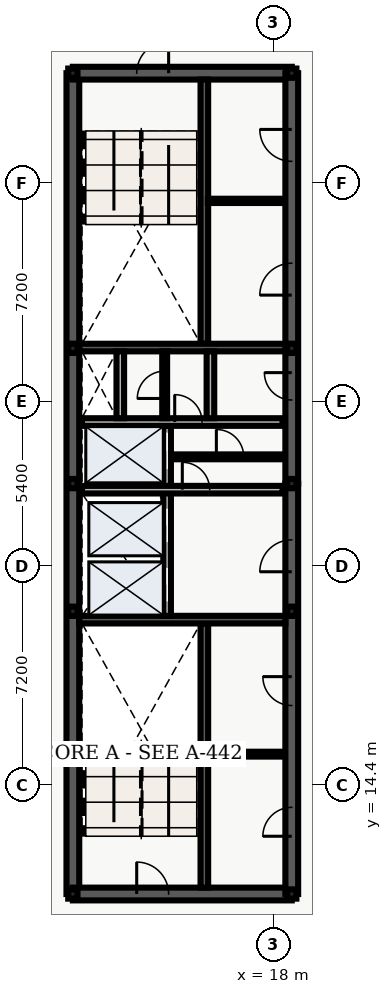
"""IFC4 building model, lengths in metres.
Left out: names, types, materials, properties, quantities, classifications, styles, units other than length and angle.
Written with IfcOpenShell. Run it as: python <this file> out.ifc"""

import sys

from ifc_helpers import new_model, entity, si_unit, converted_unit, direction, frame, origin_with_axes, origin_2d_with_axis, place, context, subcontext, project, spatial, polyline, rectangle, hollow_rectangle, outline, extrude, element, fill, save


model = new_model("IFC4")
c1 = context("Model", 3, precision=1e-05, world=origin_with_axes(), true_north=direction((0.0, 1.0)))
c2 = subcontext(c1, "Body", "Model", "MODEL_VIEW")
j1 = project(units=[si_unit("LENGTHUNIT", "METRE"), converted_unit("PLANEANGLEUNIT", "DEGREE", entity("IfcPlaneAngleMeasure", 0.017), si_unit("PLANEANGLEUNIT", "RADIAN"), dimensions=[0, 0, 0, 0, 0, 0, 0])], contexts=[c1])
p1 = place(None, origin_with_axes())
s1 = spatial("IfcSite", under=j1, at=p1, CompositionType="ELEMENT")
p2 = place(p1, origin_with_axes())
s2 = spatial("IfcBuilding", under=s1, at=p2, CompositionType="ELEMENT")
p3 = place(p2, frame((0.0, 0.0, 312.6), z_axis=(0.0, 0.0, 1.0), x_axis=(1.0, 0.0, 0.0)))
s3 = spatial("IfcBuildingStorey", under=s2, at=p3, CompositionType="ELEMENT", Elevation=312.6)
p4 = place(p3, frame((11.4, 10.8, 0.0), z_axis=(0.0, 0.0, 1.0), x_axis=(0.0, 1.0, 0.0)))
e1 = element("IfcWall", 1, at=p4, inside=s3, PredefinedType="SHEAR", context=c2, shape_type="SweptSolid", body=[
    extrude(outline(polyline([(0.0, -0.21), (27.0, -0.21), (27.0, 0.21), (0.0, 0.21), (0.0, -0.21)])), origin_with_axes(), (0.0, 0.0, 1.0), 3.64),
])
p5 = place(p3, frame((11.4, 10.8, 0.0), z_axis=(0.0, 0.0, 1.0), x_axis=(1.0, 0.0, 0.0)))
e2 = element("IfcWall", 2, at=p5, inside=s3, PredefinedType="SHEAR", context=c2, shape_type="SweptSolid", body=[
    extrude(outline(polyline([(0.0, -0.21), (7.2, -0.21), (7.2, 0.21), (0.0, 0.21), (0.0, -0.21)])), origin_with_axes(), (0.0, 0.0, 1.0), 3.64),
])
p6 = place(p5, frame((2.625, 0.0, 0.0), z_axis=(0.0, 0.0, 1.0), x_axis=(1.0, 0.0, 0.0)))
e3 = element("IfcOpeningElement", 3, at=p6, cuts=e2, PredefinedType="OPENING", context=c2, shape_type="SweptSolid", body=[
    extrude(rectangle(XDim=1.05, YDim=0.44, at=origin_2d_with_axis()), origin_with_axes(), (0.0, 0.0, 1.0), 2.15),
])
p7 = place(p3, frame((11.4, 37.8, 0.0), z_axis=(0.0, 0.0, 1.0), x_axis=(1.0, 0.0, 0.0)))
e4 = element("IfcWall", 4, at=p7, inside=s3, PredefinedType="SHEAR", context=c2, shape_type="SweptSolid", body=[
    extrude(outline(polyline([(0.0, -0.21), (7.2, -0.21), (7.2, 0.21), (0.0, 0.21), (0.0, -0.21)])), origin_with_axes(), (0.0, 0.0, 1.0), 3.64),
])
p8 = place(p7, frame((2.625, 0.0, 0.0), z_axis=(0.0, 0.0, 1.0), x_axis=(1.0, 0.0, 0.0)))
e5 = element("IfcOpeningElement", 5, at=p8, cuts=e4, PredefinedType="OPENING", context=c2, shape_type="SweptSolid", body=[
    extrude(rectangle(XDim=1.05, YDim=0.44, at=origin_2d_with_axis()), origin_with_axes(), (0.0, 0.0, 1.0), 2.15),
])
p9 = place(p3, frame((18.6, 10.8, 0.0), z_axis=(0.0, 0.0, 1.0), x_axis=(0.0, 1.0, 0.0)))
e6 = element("IfcWall", 6, at=p9, inside=s3, PredefinedType="SHEAR", context=c2, shape_type="SweptSolid", body=[
    extrude(outline(polyline([(0.0, -0.21), (13.5, -0.21), (13.5, 0.21), (0.0, 0.21), (0.0, -0.21)])), origin_with_axes(), (0.0, 0.0, 1.0), 3.64),
])
p10 = place(p9, frame((11.125, 0.0, 0.0), z_axis=(0.0, 0.0, 1.0), x_axis=(1.0, 0.0, 0.0)))
e7 = element("IfcOpeningElement", 7, at=p10, cuts=e6, PredefinedType="OPENING", context=c2, shape_type="SweptSolid", body=[
    extrude(rectangle(XDim=1.05, YDim=0.44, at=origin_2d_with_axis()), origin_with_axes(), (0.0, 0.0, 1.0), 2.15),
])
p11 = place(p9, frame((2.375, 0.0, 0.0), z_axis=(0.0, 0.0, 1.0), x_axis=(1.0, 0.0, 0.0)))
e8 = element("IfcOpeningElement", 8, at=p11, cuts=e6, PredefinedType="OPENING", context=c2, shape_type="SweptSolid", body=[
    extrude(rectangle(XDim=0.95, YDim=0.44, at=origin_2d_with_axis()), origin_with_axes(), (0.0, 0.0, 1.0), 2.15),
])
p12 = place(p9, frame((6.675, 0.0, 0.0), z_axis=(0.0, 0.0, 1.0), x_axis=(1.0, 0.0, 0.0)))
e9 = element("IfcOpeningElement", 9, at=p12, cuts=e6, PredefinedType="OPENING", context=c2, shape_type="SweptSolid", body=[
    extrude(rectangle(XDim=0.95, YDim=0.44, at=origin_2d_with_axis()), origin_with_axes(), (0.0, 0.0, 1.0), 2.15),
])
p13 = place(p3, frame((18.6, 24.3, 0.0), z_axis=(0.0, 0.0, 1.0), x_axis=(0.0, 1.0, 0.0)))
e10 = element("IfcWall", 10, at=p13, inside=s3, PredefinedType="SHEAR", context=c2, shape_type="SweptSolid", body=[
    extrude(outline(polyline([(0.0, -0.21), (13.5, -0.21), (13.5, 0.21), (0.0, 0.21), (0.0, -0.21)])), origin_with_axes(), (0.0, 0.0, 1.0), 3.64),
])
p14 = place(p13, frame((3.2, 0.0, 0.0), z_axis=(0.0, 0.0, 1.0), x_axis=(1.0, 0.0, 0.0)))
e11 = element("IfcOpeningElement", 11, at=p14, cuts=e10, PredefinedType="OPENING", context=c2, shape_type="SweptSolid", body=[
    extrude(rectangle(XDim=0.9, YDim=0.44, at=origin_2d_with_axis()), origin_with_axes(), (0.0, 0.0, 1.0), 2.15),
])
p15 = place(p13, frame((6.725, 0.0, 0.0), z_axis=(0.0, 0.0, 1.0), x_axis=(1.0, 0.0, 0.0)))
e12 = element("IfcOpeningElement", 12, at=p15, cuts=e10, PredefinedType="OPENING", context=c2, shape_type="SweptSolid", body=[
    extrude(rectangle(XDim=1.05, YDim=0.44, at=origin_2d_with_axis()), origin_with_axes(), (0.0, 0.0, 1.0), 2.15),
])
p16 = place(p13, frame((11.125, 0.0, 0.0), z_axis=(0.0, 0.0, 1.0), x_axis=(1.0, 0.0, 0.0)))
e13 = element("IfcOpeningElement", 13, at=p16, cuts=e10, PredefinedType="OPENING", context=c2, shape_type="SweptSolid", body=[
    extrude(rectangle(XDim=1.05, YDim=0.44, at=origin_2d_with_axis()), origin_with_axes(), (0.0, 0.0, 1.0), 2.15),
])
p17 = place(p3, frame((15.725, 11.01, 0.0), z_axis=(0.0, 0.0, 1.0), x_axis=(0.0, 1.0, 0.0)))
e14 = element("IfcWall", 14, at=p17, inside=s3, PredefinedType="SHEAR", context=c2, shape_type="SweptSolid", body=[
    extrude(outline(polyline([(0.0, -0.125), (8.69, -0.125), (8.69, 0.125), (0.0, 0.125), (0.0, -0.125)])), origin_with_axes(), (0.0, 0.0, 1.0), 3.64),
])
p18 = place(p3, frame((11.61, 19.825, 0.0), z_axis=(0.0, 0.0, 1.0), x_axis=(1.0, 0.0, 0.0)))
e15 = element("IfcWall", 15, at=p18, inside=s3, PredefinedType="SHEAR", context=c2, shape_type="SweptSolid", body=[
    extrude(outline(polyline([(0.0, -0.125), (6.78, -0.125), (6.78, 0.125), (0.0, 0.125), (0.0, -0.125)])), origin_with_axes(), (0.0, 0.0, 1.0), 3.64),
])
p19 = place(p3, frame((15.725, 28.9, 0.0), z_axis=(0.0, 0.0, 1.0), x_axis=(0.0, 1.0, 0.0)))
e16 = element("IfcWall", 16, at=p19, inside=s3, PredefinedType="SHEAR", context=c2, shape_type="SweptSolid", body=[
    extrude(outline(polyline([(0.0, -0.125), (8.69, -0.125), (8.69, 0.125), (0.0, 0.125), (0.0, -0.125)])), origin_with_axes(), (0.0, 0.0, 1.0), 3.64),
])
p20 = place(p3, frame((11.61, 28.775, 0.0), z_axis=(0.0, 0.0, 1.0), x_axis=(1.0, 0.0, 0.0)))
e17 = element("IfcWall", 17, at=p20, inside=s3, PredefinedType="SHEAR", context=c2, shape_type="SweptSolid", body=[
    extrude(outline(polyline([(0.0, -0.125), (6.78, -0.125), (6.78, 0.125), (0.0, 0.125), (0.0, -0.125)])), origin_with_axes(), (0.0, 0.0, 1.0), 3.64),
])
p21 = place(p3, frame((14.5, 19.95, 0.0), z_axis=(0.0, 0.0, 1.0), x_axis=(0.0, 1.0, 0.0)))
e18 = element("IfcWall", 18, at=p21, inside=s3, PredefinedType="SOLIDWALL", context=c2, shape_type="SweptSolid", body=[
    extrude(outline(polyline([(0.0, -0.125), (6.25, -0.125), (6.25, 0.125), (0.0, 0.125), (0.0, -0.125)])), origin_with_axes(), (0.0, 0.0, 1.0), 2.68),
])
p22 = place(p21, frame((1.025, 0.0, 0.0), z_axis=(0.0, 0.0, 1.0), x_axis=(1.0, 0.0, 0.0)))
e19 = element("IfcOpeningElement", 19, at=p22, cuts=e18, PredefinedType="OPENING", context=c2, shape_type="SweptSolid", body=[
    extrude(rectangle(XDim=1.1, YDim=0.27, at=origin_2d_with_axis()), origin_with_axes(), (0.0, 0.0, 1.0), 2.15),
])
p23 = place(p21, frame((2.975, 0.0, 0.0), z_axis=(0.0, 0.0, 1.0), x_axis=(1.0, 0.0, 0.0)))
e20 = element("IfcOpeningElement", 20, at=p23, cuts=e18, PredefinedType="OPENING", context=c2, shape_type="SweptSolid", body=[
    extrude(rectangle(XDim=1.1, YDim=0.27, at=origin_2d_with_axis()), origin_with_axes(), (0.0, 0.0, 1.0), 2.15),
])
p24 = place(p21, frame((5.425, 0.0, 0.0), z_axis=(0.0, 0.0, 1.0), x_axis=(1.0, 0.0, 0.0)))
e21 = element("IfcOpeningElement", 21, at=p24, cuts=e18, PredefinedType="OPENING", context=c2, shape_type="SweptSolid", body=[
    extrude(rectangle(XDim=1.2, YDim=0.27, at=origin_2d_with_axis()), origin_with_axes(), (0.0, 0.0, 1.0), 2.15),
])
p25 = place(p3, frame((11.7, 24.1, 0.0), z_axis=(0.0, 0.0, 1.0), x_axis=(1.0, 0.0, 0.0)))
e22 = element("IfcWall", 22, at=p25, inside=s3, PredefinedType="SOLIDWALL", context=c2, shape_type="SweptSolid", body=[
    extrude(outline(polyline([(0.0, -0.125), (6.6, -0.125), (6.6, 0.125), (0.0, 0.125), (0.0, -0.125)])), origin_with_axes(), (0.0, 0.0, 1.0), 2.68),
])
p26 = place(p25, frame((3.75, 0.0, 0.0), z_axis=(0.0, 0.0, 1.0), x_axis=(1.0, 0.0, 0.0)))
e23 = element("IfcOpeningElement", 23, at=p26, cuts=e22, PredefinedType="OPENING", context=c2, shape_type="SweptSolid", body=[
    extrude(rectangle(XDim=0.9, YDim=0.27, at=origin_2d_with_axis()), origin_with_axes(), (0.0, 0.0, 1.0), 2.15),
])
p27 = place(p3, frame((11.7, 26.325, 0.0), z_axis=(0.0, 0.0, 1.0), x_axis=(1.0, 0.0, 0.0)))
e24 = element("IfcWall", 24, at=p27, inside=s3, PredefinedType="SOLIDWALL", context=c2, shape_type="SweptSolid", body=[
    extrude(outline(polyline([(0.0, -0.125), (6.6, -0.125), (6.6, 0.125), (0.0, 0.125), (0.0, -0.125)])), origin_with_axes(), (0.0, 0.0, 1.0), 2.68),
])
p28 = place(p27, frame((3.5, 0.0, 0.0), z_axis=(0.0, 0.0, 1.0), x_axis=(1.0, 0.0, 0.0)))
e25 = element("IfcOpeningElement", 25, at=p28, cuts=e24, PredefinedType="OPENING", context=c2, shape_type="SweptSolid", body=[
    extrude(rectangle(XDim=0.9, YDim=0.27, at=origin_2d_with_axis()), origin_with_axes(), (0.0, 0.0, 1.0), 2.15),
])
for number, where, z_axis, x_axis in (
    (26, (12.96, 26.45, 0.0), (0.0, 0.0, 1.0), (0.0, 1.0, 0.0)),
    (27, (15.925, 26.45, 0.0), (0.0, 0.0, 1.0), (0.0, 1.0, 0.0)),
):
    element("IfcWall", number, at=place(p3, frame(where, z_axis=z_axis, x_axis=x_axis)), inside=s3, PredefinedType="SOLIDWALL", context=c2, shape_type="SweptSolid", body=[
        extrude(outline(polyline([(0.0, -0.125), (2.2, -0.125), (2.2, 0.125), (0.0, 0.125), (0.0, -0.125)])), origin_with_axes(), (0.0, 0.0, 1.0), 2.68),
    ])
for number, where, z_axis, x_axis in (
    (28, (11.4, 10.8, 0.0), (0.0, 0.0, 1.0), (1.0, 0.0, 0.0)),
    (29, (11.4, 20.1, 0.0), (0.0, 0.0, 1.0), (1.0, 0.0, 0.0)),
    (30, (11.4, 24.3, 0.0), (0.0, 0.0, 1.0), (1.0, 0.0, 0.0)),
    (31, (11.4, 28.75, 0.0), (0.0, 0.0, 1.0), (1.0, 0.0, 0.0)),
    (32, (11.4, 37.8, 0.0), (0.0, 0.0, 1.0), (1.0, 0.0, 0.0)),
    (33, (18.6, 10.8, 0.0), (0.0, 0.0, 1.0), (1.0, 0.0, 0.0)),
    (34, (18.6, 20.1, 0.0), (0.0, 0.0, 1.0), (1.0, 0.0, 0.0)),
    (35, (18.6, 24.3, 0.0), (0.0, 0.0, 1.0), (1.0, 0.0, 0.0)),
    (36, (18.6, 28.75, 0.0), (0.0, 0.0, 1.0), (1.0, 0.0, 0.0)),
    (37, (18.6, 37.8, 0.0), (0.0, 0.0, 1.0), (1.0, 0.0, 0.0)),
):
    element("IfcColumn", number, at=place(p3, frame(where, z_axis=z_axis, x_axis=x_axis)), inside=s3, PredefinedType="COLUMN", context=c2, shape_type="SweptSolid", body=[
        extrude(hollow_rectangle(XDim=0.305, YDim=0.305, WallThickness=0.015, InnerFilletRadius=0.015, OuterFilletRadius=0.03, at=origin_2d_with_axis()), origin_with_axes(), (0.0, 0.0, 1.0), 3.9),
    ])
p29 = place(p3, frame((14.62, 25.18, 0.0), z_axis=(0.0, 0.0, 1.0), x_axis=(1.0, 0.0, 0.0)))
e38 = element("IfcWall", 38, at=p29, inside=s3, PredefinedType="PARTITIONING", context=c2, shape_type="SweptSolid", body=[
    extrude(outline(polyline([(0.0, -0.08), (3.68, -0.08), (3.68, 0.08), (0.0, 0.08), (0.0, -0.08)])), origin_with_axes(), (0.0, 0.0, 1.0), 2.68),
])
p30 = place(p29, frame((1.95, 0.0, 0.0), z_axis=(0.0, 0.0, 1.0), x_axis=(1.0, 0.0, 0.0)))
e39 = element("IfcOpeningElement", 39, at=p30, cuts=e38, PredefinedType="OPENING", context=c2, shape_type="SweptSolid", body=[
    extrude(rectangle(XDim=0.9, YDim=0.18, at=origin_2d_with_axis()), origin_with_axes(), (0.0, 0.0, 1.0), 2.15),
])
p31 = place(p3, frame((14.42, 26.45, 0.0), z_axis=(0.0, 0.0, 1.0), x_axis=(0.0, 1.0, 0.0)))
e40 = element("IfcWall", 40, at=p31, inside=s3, PredefinedType="PARTITIONING", context=c2, shape_type="SweptSolid", body=[
    extrude(outline(polyline([(0.0, -0.08), (2.2, -0.08), (2.2, 0.08), (0.0, 0.08), (0.0, -0.08)])), origin_with_axes(), (0.0, 0.0, 1.0), 2.68),
])
p32 = place(p31, frame((1.1, 0.0, 0.0), z_axis=(0.0, 0.0, 1.0), x_axis=(1.0, 0.0, 0.0)))
e41 = element("IfcOpeningElement", 41, at=p32, cuts=e40, PredefinedType="OPENING", context=c2, shape_type="SweptSolid", body=[
    extrude(rectangle(XDim=0.9, YDim=0.18, at=origin_2d_with_axis()), origin_with_axes(), (0.0, 0.0, 1.0), 2.15),
])
p33 = place(p3, frame((15.84, 15.4, 0.0), z_axis=(0.0, 0.0, 1.0), x_axis=(1.0, 0.0, 0.0)))
e42 = element("IfcWall", 42, at=p33, inside=s3, PredefinedType="PARTITIONING", context=c2, shape_type="SweptSolid", body=[
    extrude(outline(polyline([(0.0, -0.08), (2.46, -0.08), (2.46, 0.08), (0.0, 0.08), (0.0, -0.08)])), origin_with_axes(), (0.0, 0.0, 1.0), 2.68),
])
p34 = place(p3, frame((15.84, 33.6, 0.0), z_axis=(0.0, 0.0, 1.0), x_axis=(1.0, 0.0, 0.0)))
e43 = element("IfcWall", 43, at=p34, inside=s3, PredefinedType="PARTITIONING", context=c2, shape_type="SweptSolid", body=[
    extrude(outline(polyline([(0.0, -0.07), (2.46, -0.07), (2.46, 0.07), (0.0, 0.07), (0.0, -0.07)])), origin_with_axes(), (0.0, 0.0, 1.0), 2.68),
])
p35 = place(p21, frame((1.025, 0.0, 0.0), z_axis=(0.0, 0.0, 1.0), x_axis=(1.0, 0.0, 0.0)))
e44 = element("IfcDoor", 44, at=p35, inside=s3, OperationType="SLIDING_TO_LEFT", PredefinedType="DOOR", context=c2, shape_type="SweptSolid", body=[
    extrude(rectangle(XDim=1.1, YDim=0.09, at=origin_2d_with_axis()), origin_with_axes(), (0.0, 0.0, 1.0), 2.15),
])
fill(e19, e44)
p36 = place(p21, frame((2.975, 0.0, 0.0), z_axis=(0.0, 0.0, 1.0), x_axis=(1.0, 0.0, 0.0)))
e45 = element("IfcDoor", 45, at=p36, inside=s3, OperationType="SLIDING_TO_RIGHT", PredefinedType="DOOR", context=c2, shape_type="SweptSolid", body=[
    extrude(rectangle(XDim=1.1, YDim=0.09, at=origin_2d_with_axis()), origin_with_axes(), (0.0, 0.0, 1.0), 2.15),
])
fill(e20, e45)
p37 = place(p21, frame((5.425, 0.0, 0.0), z_axis=(0.0, 0.0, 1.0), x_axis=(1.0, 0.0, 0.0)))
e46 = element("IfcDoor", 46, at=p37, inside=s3, OperationType="DOUBLE_DOOR_SLIDING", PredefinedType="DOOR", context=c2, shape_type="SweptSolid", body=[
    extrude(rectangle(XDim=1.2, YDim=0.09, at=origin_2d_with_axis()), origin_with_axes(), (0.0, 0.0, 1.0), 2.15),
])
fill(e21, e46)
p38 = place(p13, frame((3.2, 0.0, 0.0), z_axis=(0.0, 0.0, 1.0), x_axis=(1.0, 0.0, 0.0)))
e47 = element("IfcDoor", 47, at=p38, inside=s3, OperationType="SINGLE_SWING_RIGHT", PredefinedType="DOOR", context=c2, shape_type="SweptSolid", body=[
    extrude(rectangle(XDim=0.9, YDim=0.09, at=origin_2d_with_axis()), origin_with_axes(), (0.0, 0.0, 1.0), 2.15),
])
fill(e11, e47)
p39 = place(p5, frame((2.625, 0.0, 0.0), z_axis=(0.0, 0.0, 1.0), x_axis=(1.0, 0.0, 0.0)))
e48 = element("IfcDoor", 48, at=p39, inside=s3, OperationType="SINGLE_SWING_LEFT", PredefinedType="DOOR", context=c2, shape_type="SweptSolid", body=[
    extrude(rectangle(XDim=1.05, YDim=0.09, at=origin_2d_with_axis()), origin_with_axes(), (0.0, 0.0, 1.0), 2.15),
])
fill(e3, e48)
p40 = place(p7, frame((2.625, 0.0, 0.0), z_axis=(0.0, 0.0, 1.0), x_axis=(1.0, 0.0, 0.0)))
e49 = element("IfcDoor", 49, at=p40, inside=s3, OperationType="SINGLE_SWING_RIGHT", PredefinedType="DOOR", context=c2, shape_type="SweptSolid", body=[
    extrude(rectangle(XDim=1.05, YDim=0.09, at=origin_2d_with_axis()), origin_with_axes(), (0.0, 0.0, 1.0), 2.15),
])
fill(e5, e49)
p41 = place(p9, frame((11.125, 0.0, 0.0), z_axis=(0.0, 0.0, 1.0), x_axis=(1.0, 0.0, 0.0)))
e50 = element("IfcDoor", 50, at=p41, inside=s3, OperationType="SINGLE_SWING_LEFT", PredefinedType="DOOR", context=c2, shape_type="SweptSolid", body=[
    extrude(rectangle(XDim=1.05, YDim=0.09, at=origin_2d_with_axis()), origin_with_axes(), (0.0, 0.0, 1.0), 2.15),
])
fill(e7, e50)
p42 = place(p27, frame((3.5, 0.0, 0.0), z_axis=(0.0, 0.0, 1.0), x_axis=(1.0, 0.0, 0.0)))
e51 = element("IfcDoor", 51, at=p42, inside=s3, OperationType="SINGLE_SWING_LEFT", PredefinedType="DOOR", context=c2, shape_type="SweptSolid", body=[
    extrude(rectangle(XDim=0.9, YDim=0.09, at=origin_2d_with_axis()), origin_with_axes(), (0.0, 0.0, 1.0), 2.15),
])
fill(e25, e51)
p43 = place(p31, frame((1.1, 0.0, 0.0), z_axis=(0.0, 0.0, 1.0), x_axis=(1.0, 0.0, 0.0)))
e52 = element("IfcDoor", 52, at=p43, inside=s3, OperationType="SINGLE_SWING_LEFT", PredefinedType="DOOR", context=c2, shape_type="SweptSolid", body=[
    extrude(rectangle(XDim=0.9, YDim=0.09, at=origin_2d_with_axis()), origin_with_axes(), (0.0, 0.0, 1.0), 2.15),
])
fill(e41, e52)
p44 = place(p25, frame((3.75, 0.0, 0.0), z_axis=(0.0, 0.0, 1.0), x_axis=(1.0, 0.0, 0.0)))
e53 = element("IfcDoor", 53, at=p44, inside=s3, OperationType="SINGLE_SWING_LEFT", PredefinedType="DOOR", context=c2, shape_type="SweptSolid", body=[
    extrude(rectangle(XDim=0.9, YDim=0.09, at=origin_2d_with_axis()), origin_with_axes(), (0.0, 0.0, 1.0), 2.15),
])
fill(e23, e53)
p45 = place(p29, frame((1.95, 0.0, 0.0), z_axis=(0.0, 0.0, 1.0), x_axis=(1.0, 0.0, 0.0)))
e54 = element("IfcDoor", 54, at=p45, inside=s3, OperationType="SINGLE_SWING_LEFT", PredefinedType="DOOR", context=c2, shape_type="SweptSolid", body=[
    extrude(rectangle(XDim=0.9, YDim=0.09, at=origin_2d_with_axis()), origin_with_axes(), (0.0, 0.0, 1.0), 2.15),
])
fill(e39, e54)
p46 = place(p9, frame((2.375, 0.0, 0.0), z_axis=(0.0, 0.0, 1.0), x_axis=(1.0, 0.0, 0.0)))
e55 = element("IfcDoor", 55, at=p46, inside=s3, OperationType="SINGLE_SWING_LEFT", PredefinedType="DOOR", context=c2, shape_type="SweptSolid", body=[
    extrude(rectangle(XDim=0.95, YDim=0.09, at=origin_2d_with_axis()), origin_with_axes(), (0.0, 0.0, 1.0), 2.15),
])
fill(e8, e55)
p47 = place(p9, frame((6.675, 0.0, 0.0), z_axis=(0.0, 0.0, 1.0), x_axis=(1.0, 0.0, 0.0)))
e56 = element("IfcDoor", 56, at=p47, inside=s3, OperationType="SINGLE_SWING_RIGHT", PredefinedType="DOOR", context=c2, shape_type="SweptSolid", body=[
    extrude(rectangle(XDim=0.95, YDim=0.09, at=origin_2d_with_axis()), origin_with_axes(), (0.0, 0.0, 1.0), 2.15),
])
fill(e9, e56)
p48 = place(p13, frame((6.725, 0.0, 0.0), z_axis=(0.0, 0.0, 1.0), x_axis=(1.0, 0.0, 0.0)))
e57 = element("IfcDoor", 57, at=p48, inside=s3, OperationType="SINGLE_SWING_LEFT", PredefinedType="DOOR", context=c2, shape_type="SweptSolid", body=[
    extrude(rectangle(XDim=1.05, YDim=0.09, at=origin_2d_with_axis()), origin_with_axes(), (0.0, 0.0, 1.0), 2.15),
])
fill(e12, e57)
p49 = place(p13, frame((11.125, 0.0, 0.0), z_axis=(0.0, 0.0, 1.0), x_axis=(1.0, 0.0, 0.0)))
e58 = element("IfcDoor", 58, at=p49, inside=s3, OperationType="SINGLE_SWING_RIGHT", PredefinedType="DOOR", context=c2, shape_type="SweptSolid", body=[
    extrude(rectangle(XDim=1.05, YDim=0.09, at=origin_2d_with_axis()), origin_with_axes(), (0.0, 0.0, 1.0), 2.15),
])
fill(e13, e58)
save(model, sys.argv[1])
